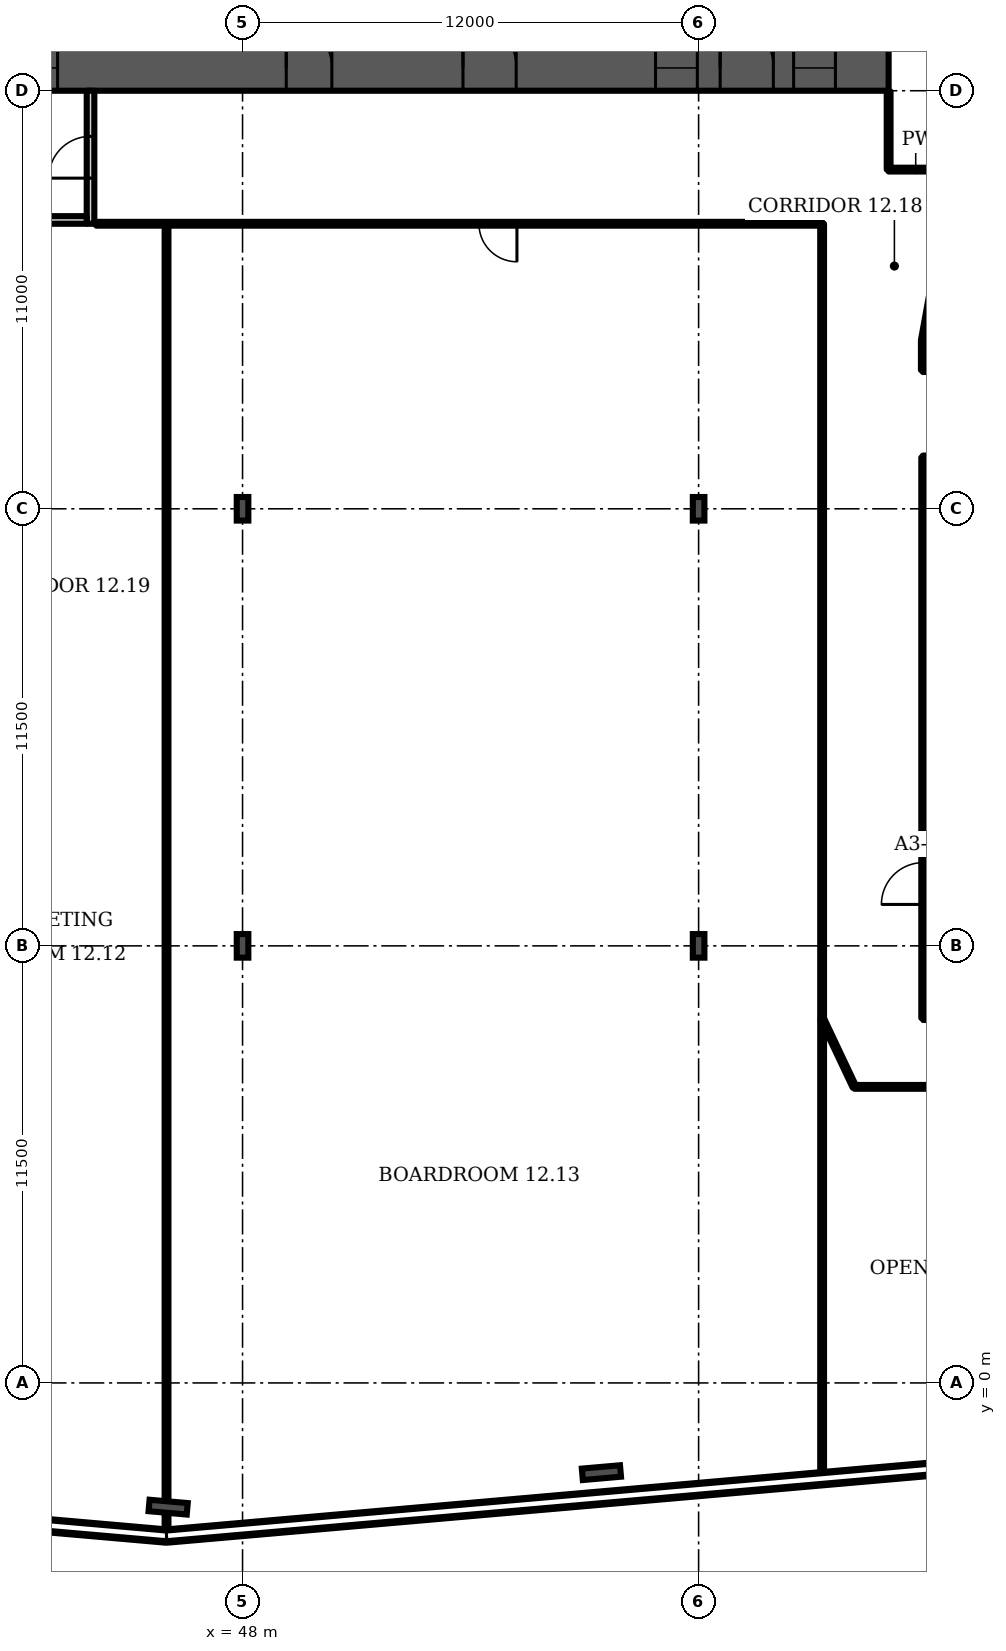
"""IFC4 building model, lengths in metres.
Left out: names, types, materials, properties, quantities, classifications, styles, units other than length and angle.
Written with IfcOpenShell. Run it as: python <this file> out.ifc"""

import sys

from ifc_helpers import new_model, si_unit, direction, frame, frame_2d, origin, origin_2d, place, context, subcontext, project, spatial, rectangle, i_section, extrude, element, fill, save


model = new_model("IFC4")
c1 = context("Model", 3, precision=1e-05, world=origin(), true_north=direction((0.0, 1.0)))
c2 = subcontext(c1, "Body", "Model", "MODEL_VIEW")
j1 = project(units=[si_unit("LENGTHUNIT", "METRE"), si_unit("PLANEANGLEUNIT", "RADIAN")], contexts=[c1])
p1 = place(None, origin())
s1 = spatial("IfcSite", under=j1, at=p1, CompositionType="ELEMENT")
p2 = place(p1, origin())
s2 = spatial("IfcBuilding", under=s1, at=p2, CompositionType="ELEMENT")
p3 = place(p2, frame((0.0, 0.0, 63.1)))
s3 = spatial("IfcBuildingStorey", under=s2, at=p3, CompositionType="ELEMENT", Elevation=63.1)
p4 = place(p3, frame((9.0, 34.6, 0.0), z_axis=(0.0, 0.0, 1.0), x_axis=(1.0, 0.0, 0.0)))
e1 = element("IfcWall", 1, at=p4, inside=s3, PredefinedType="SHEAR", context=c2, shape_type="SweptSolid", body=[
    extrude(rectangle(XDim=56.0, YDim=1.2, at=frame_2d((28.0, 0.0))), origin(), (0.0, 0.0, 1.0), 3.6),
])
p5 = place(p4, frame((3.3, 0.0, 0.0)))
e2 = element("IfcOpeningElement", 2, at=p5, cuts=e1, PredefinedType="OPENING", context=c2, shape_type="SweptSolid", body=[
    extrude(rectangle(XDim=1.0, YDim=2.1, at=frame_2d((0.5, 1.05))), frame((0.0, 0.61, 0.0), z_axis=(0.0, -1.0, 0.0), x_axis=(1.0, 0.0, 0.0)), (0.0, 0.0, 1.0), 1.22),
])
p6 = place(p4, frame((7.867, 0.0, 0.0)))
e3 = element("IfcOpeningElement", 3, at=p6, cuts=e1, PredefinedType="OPENING", context=c2, shape_type="SweptSolid", body=[
    extrude(rectangle(XDim=1.1, YDim=2.1, at=frame_2d((0.55, 1.05))), frame((0.0, 0.61, 0.0), z_axis=(0.0, -1.0, 0.0), x_axis=(1.0, 0.0, 0.0)), (0.0, 0.0, 1.0), 1.22),
])
p7 = place(p4, frame((12.033, 0.0, 0.0)))
e4 = element("IfcOpeningElement", 4, at=p7, cuts=e1, PredefinedType="OPENING", context=c2, shape_type="SweptSolid", body=[
    extrude(rectangle(XDim=1.1, YDim=2.1, at=frame_2d((0.55, 1.05))), frame((0.0, 0.61, 0.0), z_axis=(0.0, -1.0, 0.0), x_axis=(1.0, 0.0, 0.0)), (0.0, 0.0, 1.0), 1.22),
])
p8 = place(p4, frame((9.8, 0.0, 0.0)))
e5 = element("IfcOpeningElement", 5, at=p8, cuts=e1, PredefinedType="OPENING", context=c2, shape_type="SweptSolid", body=[
    extrude(rectangle(XDim=1.4, YDim=2.1, at=frame_2d((0.7, 1.05))), frame((0.0, 0.61, 0.0), z_axis=(0.0, -1.0, 0.0), x_axis=(1.0, 0.0, 0.0)), (0.0, 0.0, 1.0), 1.22),
])
p9 = place(p4, frame((14.65, 0.0, 0.0)))
e6 = element("IfcOpeningElement", 6, at=p9, cuts=e1, PredefinedType="OPENING", context=c2, shape_type="SweptSolid", body=[
    extrude(rectangle(XDim=1.2, YDim=2.1, at=frame_2d((0.6, 1.05))), frame((0.0, 0.61, 0.0), z_axis=(0.0, -1.0, 0.0), x_axis=(1.0, 0.0, 0.0)), (0.0, 0.0, 1.0), 1.22),
])
p10 = place(p4, frame((21.867, 0.0, 0.0)))
e7 = element("IfcOpeningElement", 7, at=p10, cuts=e1, PredefinedType="OPENING", context=c2, shape_type="SweptSolid", body=[
    extrude(rectangle(XDim=1.1, YDim=2.1, at=frame_2d((0.55, 1.05))), frame((0.0, 0.61, 0.0), z_axis=(0.0, -1.0, 0.0), x_axis=(1.0, 0.0, 0.0)), (0.0, 0.0, 1.0), 1.22),
])
p11 = place(p4, frame((26.033, 0.0, 0.0)))
e8 = element("IfcOpeningElement", 8, at=p11, cuts=e1, PredefinedType="OPENING", context=c2, shape_type="SweptSolid", body=[
    extrude(rectangle(XDim=1.1, YDim=2.1, at=frame_2d((0.55, 1.05))), frame((0.0, 0.61, 0.0), z_axis=(0.0, -1.0, 0.0), x_axis=(1.0, 0.0, 0.0)), (0.0, 0.0, 1.0), 1.22),
])
p12 = place(p4, frame((23.8, 0.0, 0.0)))
e9 = element("IfcOpeningElement", 9, at=p12, cuts=e1, PredefinedType="OPENING", context=c2, shape_type="SweptSolid", body=[
    extrude(rectangle(XDim=1.4, YDim=2.1, at=frame_2d((0.7, 1.05))), frame((0.0, 0.61, 0.0), z_axis=(0.0, -1.0, 0.0), x_axis=(1.0, 0.0, 0.0)), (0.0, 0.0, 1.0), 1.22),
])
p13 = place(p4, frame((28.867, 0.0, 0.0)))
e10 = element("IfcOpeningElement", 10, at=p13, cuts=e1, PredefinedType="OPENING", context=c2, shape_type="SweptSolid", body=[
    extrude(rectangle(XDim=1.1, YDim=2.1, at=frame_2d((0.55, 1.05))), frame((0.0, 0.61, 0.0), z_axis=(0.0, -1.0, 0.0), x_axis=(1.0, 0.0, 0.0)), (0.0, 0.0, 1.0), 1.22),
])
p14 = place(p4, frame((33.033, 0.0, 0.0)))
e11 = element("IfcOpeningElement", 11, at=p14, cuts=e1, PredefinedType="OPENING", context=c2, shape_type="SweptSolid", body=[
    extrude(rectangle(XDim=1.1, YDim=2.1, at=frame_2d((0.55, 1.05))), frame((0.0, 0.61, 0.0), z_axis=(0.0, -1.0, 0.0), x_axis=(1.0, 0.0, 0.0)), (0.0, 0.0, 1.0), 1.22),
])
p15 = place(p4, frame((40.15, 0.0, 0.0)))
e12 = element("IfcOpeningElement", 12, at=p15, cuts=e1, PredefinedType="OPENING", context=c2, shape_type="SweptSolid", body=[
    extrude(rectangle(XDim=1.2, YDim=2.1, at=frame_2d((0.6, 1.05))), frame((0.0, 0.61, 0.0), z_axis=(0.0, -1.0, 0.0), x_axis=(1.0, 0.0, 0.0)), (0.0, 0.0, 1.0), 1.22),
])
p16 = place(p4, frame((44.8, 0.0, 0.0)))
e13 = element("IfcOpeningElement", 13, at=p16, cuts=e1, PredefinedType="OPENING", context=c2, shape_type="SweptSolid", body=[
    extrude(rectangle(XDim=1.4, YDim=2.1, at=frame_2d((0.7, 1.05))), frame((0.0, 0.61, 0.0), z_axis=(0.0, -1.0, 0.0), x_axis=(1.0, 0.0, 0.0)), (0.0, 0.0, 1.0), 1.22),
])
p17 = place(p4, frame((49.867, 0.0, 0.0)))
e14 = element("IfcOpeningElement", 14, at=p17, cuts=e1, PredefinedType="OPENING", context=c2, shape_type="SweptSolid", body=[
    extrude(rectangle(XDim=1.1, YDim=2.1, at=frame_2d((0.55, 1.05))), frame((0.0, 0.61, 0.0), z_axis=(0.0, -1.0, 0.0), x_axis=(1.0, 0.0, 0.0)), (0.0, 0.0, 1.0), 1.22),
])
p18 = place(p4, frame((53.5, 0.0, 0.0)))
e15 = element("IfcOpeningElement", 15, at=p18, cuts=e1, PredefinedType="OPENING", context=c2, shape_type="SweptSolid", body=[
    extrude(rectangle(XDim=1.1, YDim=2.1, at=frame_2d((0.55, 1.05))), frame((0.0, 0.61, 0.0), z_axis=(0.0, -1.0, 0.0), x_axis=(1.0, 0.0, 0.0)), (0.0, 0.0, 1.0), 1.22),
])
p19 = place(p4, frame((51.567, 0.0, 0.0)))
e16 = element("IfcOpeningElement", 16, at=p19, cuts=e1, PredefinedType="OPENING", context=c2, shape_type="SweptSolid", body=[
    extrude(rectangle(XDim=1.4, YDim=2.1, at=frame_2d((0.7, 1.05))), frame((0.0, 0.61, 0.0), z_axis=(0.0, -1.0, 0.0), x_axis=(1.0, 0.0, 0.0)), (0.0, 0.0, 1.0), 1.22),
])
for number, where, z_axis, x_axis in (
    (17, (46.042, -3.268, 0.0), (0.0, 0.0, 1.0), (-0.087, -0.996, 0.0)),
    (18, (57.442, -2.361, 0.0), (0.0, 0.0, 1.0), (0.087, -0.996, 0.0)),
):
    element("IfcColumn", number, at=place(p3, frame(where, z_axis=z_axis, x_axis=x_axis)), inside=s3, PredefinedType="COLUMN", context=c2, shape_type="SweptSolid", body=[
        extrude(i_section(OverallWidth=0.302, OverallDepth=1.008, WebThickness=0.021, FlangeThickness=0.04, FilletRadius=0.03, at=origin_2d()), origin(), (0.0, 0.0, 1.0), 3.6),
    ])
for number, where, z_axis, x_axis in (
    (19, (48.0, 11.5, 0.0), (0.0, 0.0, 1.0), (1.0, 0.0, 0.0)),
    (20, (60.0, 11.5, 0.0), (0.0, 0.0, 1.0), (1.0, 0.0, 0.0)),
    (21, (48.0, 23.0, 0.0), (0.0, 0.0, 1.0), (1.0, 0.0, 0.0)),
    (22, (60.0, 23.0, 0.0), (0.0, 0.0, 1.0), (1.0, 0.0, 0.0)),
):
    element("IfcColumn", number, at=place(p3, frame(where, z_axis=z_axis, x_axis=x_axis)), inside=s3, PredefinedType="COLUMN", context=c2, shape_type="SweptSolid", body=[
        extrude(i_section(OverallWidth=0.305, OverallDepth=0.62, WebThickness=0.021, FlangeThickness=0.04, FilletRadius=0.027, at=origin_2d()), origin(), (0.0, 0.0, 1.0), 3.6),
    ])
p20 = place(p3, frame((34.601, -3.032, 0.0), z_axis=(0.0, 0.0, 1.0), x_axis=(0.996193, -0.087148, 0.0)))
e23 = element("IfcWall", 23, at=p20, inside=s3, PredefinedType="SOLIDWALL", context=c2, shape_type="SweptSolid", body=[
    extrude(rectangle(XDim=11.458, YDim=0.35, at=frame_2d((5.729, 0.0))), origin(), (0.0, 0.0, 1.0), 1.0),
])
p21 = place(p3, frame((46.045, -4.026, 0.0), z_axis=(0.0, 0.0, 1.0), x_axis=(0.99619, 0.087163, 0.0)))
e24 = element("IfcWall", 24, at=p21, inside=s3, PredefinedType="SOLIDWALL", context=c2, shape_type="SweptSolid", body=[
    extrude(rectangle(XDim=23.013, YDim=0.35, at=frame_2d((11.506, 0.0))), origin(), (0.0, 0.0, 1.0), 1.0),
])
p22 = place(p3, frame((44.0, 30.5, 0.0), z_axis=(0.0, 0.0, 1.0), x_axis=(0.0, 1.0, 0.0)))
e25 = element("IfcWall", 25, at=p22, inside=s3, PredefinedType="PARTITIONING", context=c2, shape_type="SweptSolid", body=[
    extrude(rectangle(XDim=3.5, YDim=0.2, at=frame_2d((1.75, 0.0))), origin(), (0.0, 0.0, 1.0), 3.2),
])
p23 = place(p22, frame((1.2, 0.0, 0.0)))
e26 = element("IfcOpeningElement", 26, at=p23, cuts=e25, PredefinedType="OPENING", context=c2, shape_type="SweptSolid", body=[
    extrude(rectangle(XDim=1.1, YDim=2.1, at=frame_2d((0.55, 1.05))), frame((0.0, 0.11, 0.0), z_axis=(0.0, -1.0, 0.0), x_axis=(1.0, 0.0, 0.0)), (0.0, 0.0, 1.0), 0.22),
])
p24 = place(p3, frame((41.1, 30.6, 0.0), z_axis=(0.0, 0.0, 1.0), x_axis=(1.0, 0.0, 0.0)))
e27 = element("IfcWall", 27, at=p24, inside=s3, PredefinedType="PARTITIONING", context=c2, shape_type="SweptSolid", body=[
    extrude(rectangle(XDim=2.8, YDim=0.2, at=frame_2d((1.4, 0.0))), origin(), (0.0, 0.0, 1.0), 3.2),
])
p25 = place(p3, frame((46.0, -4.004, 0.0), z_axis=(0.0, 0.0, 1.0), x_axis=(0.0, 1.0, 0.0)))
e28 = element("IfcWall", 28, at=p25, inside=s3, PredefinedType="PARTITIONING", context=c2, shape_type="SweptSolid", body=[
    extrude(rectangle(XDim=34.504, YDim=0.1, at=frame_2d((17.252, 0.0))), origin(), (0.0, 0.0, 1.0), 3.2),
])
p26 = place(p3, frame((63.25, -2.495, 0.0), z_axis=(0.0, 0.0, 1.0), x_axis=(0.0, 1.0, 0.0)))
e29 = element("IfcWall", 29, at=p26, inside=s3, PredefinedType="PARTITIONING", context=c2, shape_type="SweptSolid", body=[
    extrude(rectangle(XDim=32.995, YDim=0.1, at=frame_2d((16.498, 0.0))), origin(), (0.0, 0.0, 1.0), 2.58),
])
p27 = place(p3, frame((64.1, 7.79, 0.0), z_axis=(0.0, 0.0, 1.0), x_axis=(1.0, 0.0, 0.0)))
e30 = element("IfcWall", 30, at=p27, inside=s3, PredefinedType="PARTITIONING", context=c2, shape_type="SweptSolid", body=[
    extrude(rectangle(XDim=8.417, YDim=0.1, at=frame_2d((4.209, 0.0))), origin(), (0.0, 0.0, 1.0), 3.2),
])
p28 = place(p27, frame((2.913, 0.0, 0.0)))
e31 = element("IfcOpeningElement", 31, at=p28, cuts=e30, PredefinedType="OPENING", context=c2, shape_type="SweptSolid", body=[
    extrude(rectangle(XDim=1.0, YDim=2.1, at=frame_2d((0.5, 1.05))), frame((0.0, 0.06, 0.0), z_axis=(0.0, -1.0, 0.0), x_axis=(1.0, 0.0, 0.0)), (0.0, 0.0, 1.0), 0.12),
])
p29 = place(p3, frame((64.1, 7.79, 0.0), z_axis=(0.0, 0.0, 1.0), x_axis=(-0.428035, 0.903766, 0.0)))
e32 = element("IfcWall", 32, at=p29, inside=s3, PredefinedType="PARTITIONING", context=c2, shape_type="SweptSolid", body=[
    extrude(rectangle(XDim=1.986, YDim=0.1, at=frame_2d((0.993, 0.0))), origin(), (0.0, 0.0, 1.0), 3.2),
])
p30 = place(p3, frame((65.0, 31.925, 0.0), z_axis=(0.0, 0.0, 1.0), x_axis=(0.0, 1.0, 0.0)))
e33 = element("IfcWall", 33, at=p30, inside=s3, PredefinedType="PARTITIONING", context=c2, shape_type="SweptSolid", body=[
    extrude(rectangle(XDim=2.055, YDim=0.1, at=frame_2d((1.027, 0.0))), origin(), (0.0, 0.0, 1.0), 3.2),
])
p31 = place(p3, frame((65.0, 31.925, 0.0), z_axis=(0.0, 0.0, 1.0), x_axis=(1.0, 0.0, 0.0)))
e34 = element("IfcWall", 34, at=p31, inside=s3, PredefinedType="PARTITIONING", context=c2, shape_type="SweptSolid", body=[
    extrude(rectangle(XDim=1.425, YDim=0.1, at=frame_2d((0.712, 0.0))), origin(), (0.0, 0.0, 1.0), 3.2),
])
p32 = place(p3, frame((65.9, 24.35, 0.0), z_axis=(0.0, 0.0, 1.0), x_axis=(1.0, 0.0, 0.0)))
e35 = element("IfcWall", 35, at=p32, inside=s3, PredefinedType="PARTITIONING", context=c2, shape_type="SweptSolid", body=[
    extrude(rectangle(XDim=6.205, YDim=0.1, at=frame_2d((3.103, 0.0))), origin(), (0.0, 0.0, 1.0), 3.2),
])
p33 = place(p32, frame((0.265, 0.0, 0.0)))
e36 = element("IfcOpeningElement", 36, at=p33, cuts=e35, PredefinedType="OPENING", context=c2, shape_type="SweptSolid", body=[
    extrude(rectangle(XDim=1.0, YDim=2.1, at=frame_2d((0.5, 1.05))), frame((0.0, 0.06, 0.0), z_axis=(0.0, -1.0, 0.0), x_axis=(1.0, 0.0, 0.0)), (0.0, 0.0, 1.0), 0.12),
])
p34 = place(p3, frame((65.9, 26.65, 0.0), z_axis=(0.0, 0.0, 1.0), x_axis=(0.0, 1.0, 0.0)))
e37 = element("IfcWall", 37, at=p34, inside=s3, PredefinedType="PARTITIONING", context=c2, shape_type="SweptSolid", body=[
    extrude(rectangle(XDim=0.785, YDim=0.1, at=frame_2d((0.393, 0.0))), origin(), (0.0, 0.0, 1.0), 3.2),
])
p35 = place(p3, frame((65.9, 26.65, 0.0), z_axis=(0.0, 0.0, 1.0), x_axis=(1.0, 0.0, 0.0)))
e38 = element("IfcWall", 38, at=p35, inside=s3, PredefinedType="PARTITIONING", context=c2, shape_type="SweptSolid", body=[
    extrude(rectangle(XDim=6.205, YDim=0.1, at=frame_2d((3.103, 0.0))), origin(), (0.0, 0.0, 1.0), 3.2),
])
p36 = place(p35, frame((1.805, 0.0, 0.0)))
e39 = element("IfcOpeningElement", 39, at=p36, cuts=e38, PredefinedType="OPENING", context=c2, shape_type="SweptSolid", body=[
    extrude(rectangle(XDim=1.8, YDim=2.1, at=frame_2d((0.9, 1.05))), frame((0.0, 0.06, 0.0), z_axis=(0.0, -1.0, 0.0), x_axis=(1.0, 0.0, 0.0)), (0.0, 0.0, 1.0), 0.12),
])
p37 = place(p3, frame((65.9, 27.435, 0.0), z_axis=(0.0, 0.0, 1.0), x_axis=(0.178584, 0.983924, 0.0)))
e40 = element("IfcWall", 40, at=p37, inside=s3, PredefinedType="PARTITIONING", context=c2, shape_type="SweptSolid", body=[
    extrude(rectangle(XDim=2.353, YDim=0.1, at=frame_2d((1.176, 0.0))), origin(), (0.0, 0.0, 1.0), 3.2),
])
p38 = place(p3, frame((65.91, 9.6, 0.0), z_axis=(0.0, 0.0, 1.0), x_axis=(0.0, 1.0, 0.0)))
e41 = element("IfcWall", 41, at=p38, inside=s3, PredefinedType="PARTITIONING", context=c2, shape_type="SweptSolid", body=[
    extrude(rectangle(XDim=14.75, YDim=0.1, at=frame_2d((7.375, 0.0))), origin(), (0.0, 0.0, 1.0), 3.2),
])
p39 = place(p38, frame((2.99, 0.0, 0.0)))
e42 = element("IfcOpeningElement", 42, at=p39, cuts=e41, PredefinedType="OPENING", context=c2, shape_type="SweptSolid", body=[
    extrude(rectangle(XDim=1.1, YDim=2.1, at=frame_2d((0.55, 1.05))), frame((0.0, 0.06, 0.0), z_axis=(0.0, -1.0, 0.0), x_axis=(1.0, 0.0, 0.0)), (0.0, 0.0, 1.0), 0.12),
])
p40 = place(p3, frame((65.91, 9.6, 0.0), z_axis=(0.0, 0.0, 1.0), x_axis=(1.0, 0.0, 0.0)))
e43 = element("IfcWall", 43, at=p40, inside=s3, PredefinedType="PARTITIONING", context=c2, shape_type="SweptSolid", body=[
    extrude(rectangle(XDim=9.485, YDim=0.1, at=frame_2d((4.743, 0.0))), origin(), (0.0, 0.0, 1.0), 3.2),
])
p41 = place(p3, frame((65.91, 18.595, 0.0), z_axis=(0.0, 0.0, 1.0), x_axis=(1.0, 0.0, 0.0)))
e44 = element("IfcWall", 44, at=p41, inside=s3, PredefinedType="PARTITIONING", context=c2, shape_type="SweptSolid", body=[
    extrude(rectangle(XDim=8.84, YDim=0.1, at=frame_2d((4.42, 0.0))), origin(), (0.0, 0.0, 1.0), 3.2),
])
p42 = place(p3, frame((44.15, 30.5, 0.0), z_axis=(0.0, 0.0, 1.0), x_axis=(1.0, 0.0, 0.0)))
e45 = element("IfcWall", 45, at=p42, inside=s3, PredefinedType="PARTITIONING", context=c2, shape_type="SweptSolid", body=[
    extrude(rectangle(XDim=19.1, YDim=0.1, at=frame_2d((9.55, 0.0))), origin(), (0.0, 0.0, 1.0), 3.2),
])
p43 = place(p42, frame((10.07, 0.0, 0.0)))
e46 = element("IfcOpeningElement", 46, at=p43, cuts=e45, PredefinedType="OPENING", context=c2, shape_type="SweptSolid", body=[
    extrude(rectangle(XDim=1.0, YDim=2.1, at=frame_2d((0.5, 1.05))), frame((0.0, 0.06, 0.0), z_axis=(0.0, -1.0, 0.0), x_axis=(1.0, 0.0, 0.0)), (0.0, 0.0, 1.0), 0.12),
])
p44 = place(p14, origin())
e47 = element("IfcDoor", 47, at=p44, inside=s3, OperationType="DOUBLE_DOOR_SLIDING", PredefinedType="DOOR", context=c2, shape_type="SweptSolid", body=[
    extrude(rectangle(XDim=1.1, YDim=2.1, at=frame_2d((0.55, 1.05))), frame((0.0, 0.025, 0.0), z_axis=(0.0, -1.0, 0.0), x_axis=(1.0, 0.0, 0.0)), (0.0, 0.0, 1.0), 0.05),
])
fill(e11, e47)
p45 = place(p15, origin())
e48 = element("IfcDoor", 48, at=p45, inside=s3, OperationType="SINGLE_SWING_LEFT", PredefinedType="DOOR", context=c2, shape_type="SweptSolid", body=[
    extrude(rectangle(XDim=1.2, YDim=2.1, at=frame_2d((0.6, 1.05))), frame((0.0, 0.025, 0.0), z_axis=(0.0, -1.0, 0.0), x_axis=(1.0, 0.0, 0.0)), (0.0, 0.0, 1.0), 0.05),
])
fill(e12, e48)
p46 = place(p16, origin())
e49 = element("IfcDoor", 49, at=p46, inside=s3, OperationType="DOUBLE_DOOR_SINGLE_SWING", PredefinedType="DOOR", context=c2, shape_type="SweptSolid", body=[
    extrude(rectangle(XDim=1.4, YDim=2.1, at=frame_2d((0.7, 1.05))), frame((0.0, 0.025, 0.0), z_axis=(0.0, -1.0, 0.0), x_axis=(1.0, 0.0, 0.0)), (0.0, 0.0, 1.0), 0.05),
])
fill(e13, e49)
p47 = place(p17, origin())
e50 = element("IfcDoor", 50, at=p47, inside=s3, OperationType="DOUBLE_DOOR_SLIDING", PredefinedType="DOOR", context=c2, shape_type="SweptSolid", body=[
    extrude(rectangle(XDim=1.1, YDim=2.1, at=frame_2d((0.55, 1.05))), frame((0.0, 0.025, 0.0), z_axis=(0.0, -1.0, 0.0), x_axis=(1.0, 0.0, 0.0)), (0.0, 0.0, 1.0), 0.05),
])
fill(e14, e50)
p48 = place(p18, origin())
e51 = element("IfcDoor", 51, at=p48, inside=s3, OperationType="DOUBLE_DOOR_SLIDING", PredefinedType="DOOR", context=c2, shape_type="SweptSolid", body=[
    extrude(rectangle(XDim=1.1, YDim=2.1, at=frame_2d((0.55, 1.05))), frame((0.0, 0.025, 0.0), z_axis=(0.0, -1.0, 0.0), x_axis=(1.0, 0.0, 0.0)), (0.0, 0.0, 1.0), 0.05),
])
fill(e15, e51)
p49 = place(p19, origin())
e52 = element("IfcDoor", 52, at=p49, inside=s3, OperationType="DOUBLE_DOOR_SINGLE_SWING", PredefinedType="DOOR", context=c2, shape_type="SweptSolid", body=[
    extrude(rectangle(XDim=1.4, YDim=2.1, at=frame_2d((0.7, 1.05))), frame((0.0, 0.025, 0.0), z_axis=(0.0, -1.0, 0.0), x_axis=(1.0, 0.0, 0.0)), (0.0, 0.0, 1.0), 0.05),
])
fill(e16, e52)
p50 = place(p23, origin())
e53 = element("IfcDoor", 53, at=p50, inside=s3, OperationType="SINGLE_SWING_LEFT", PredefinedType="DOOR", context=c2, shape_type="SweptSolid", body=[
    extrude(rectangle(XDim=1.1, YDim=2.1, at=frame_2d((0.55, 1.05))), frame((0.0, 0.025, 0.0), z_axis=(0.0, -1.0, 0.0), x_axis=(1.0, 0.0, 0.0)), (0.0, 0.0, 1.0), 0.05),
])
fill(e26, e53)
p51 = place(p39, origin())
e54 = element("IfcDoor", 54, at=p51, inside=s3, OperationType="SINGLE_SWING_LEFT", PredefinedType="DOOR", context=c2, shape_type="SweptSolid", body=[
    extrude(rectangle(XDim=1.1, YDim=2.1, at=frame_2d((0.55, 1.05))), frame((0.0, 0.025, 0.0), z_axis=(0.0, -1.0, 0.0), x_axis=(1.0, 0.0, 0.0)), (0.0, 0.0, 1.0), 0.05),
])
fill(e42, e54)
p52 = place(p43, origin())
e55 = element("IfcDoor", 55, at=p52, inside=s3, OperationType="SINGLE_SWING_RIGHT", PredefinedType="DOOR", context=c2, shape_type="SweptSolid", body=[
    extrude(rectangle(XDim=1.0, YDim=2.1, at=frame_2d((0.5, 1.05))), frame((0.0, 0.025, 0.0), z_axis=(0.0, -1.0, 0.0), x_axis=(1.0, 0.0, 0.0)), (0.0, 0.0, 1.0), 0.05),
])
fill(e46, e55)
save(model, sys.argv[1])
